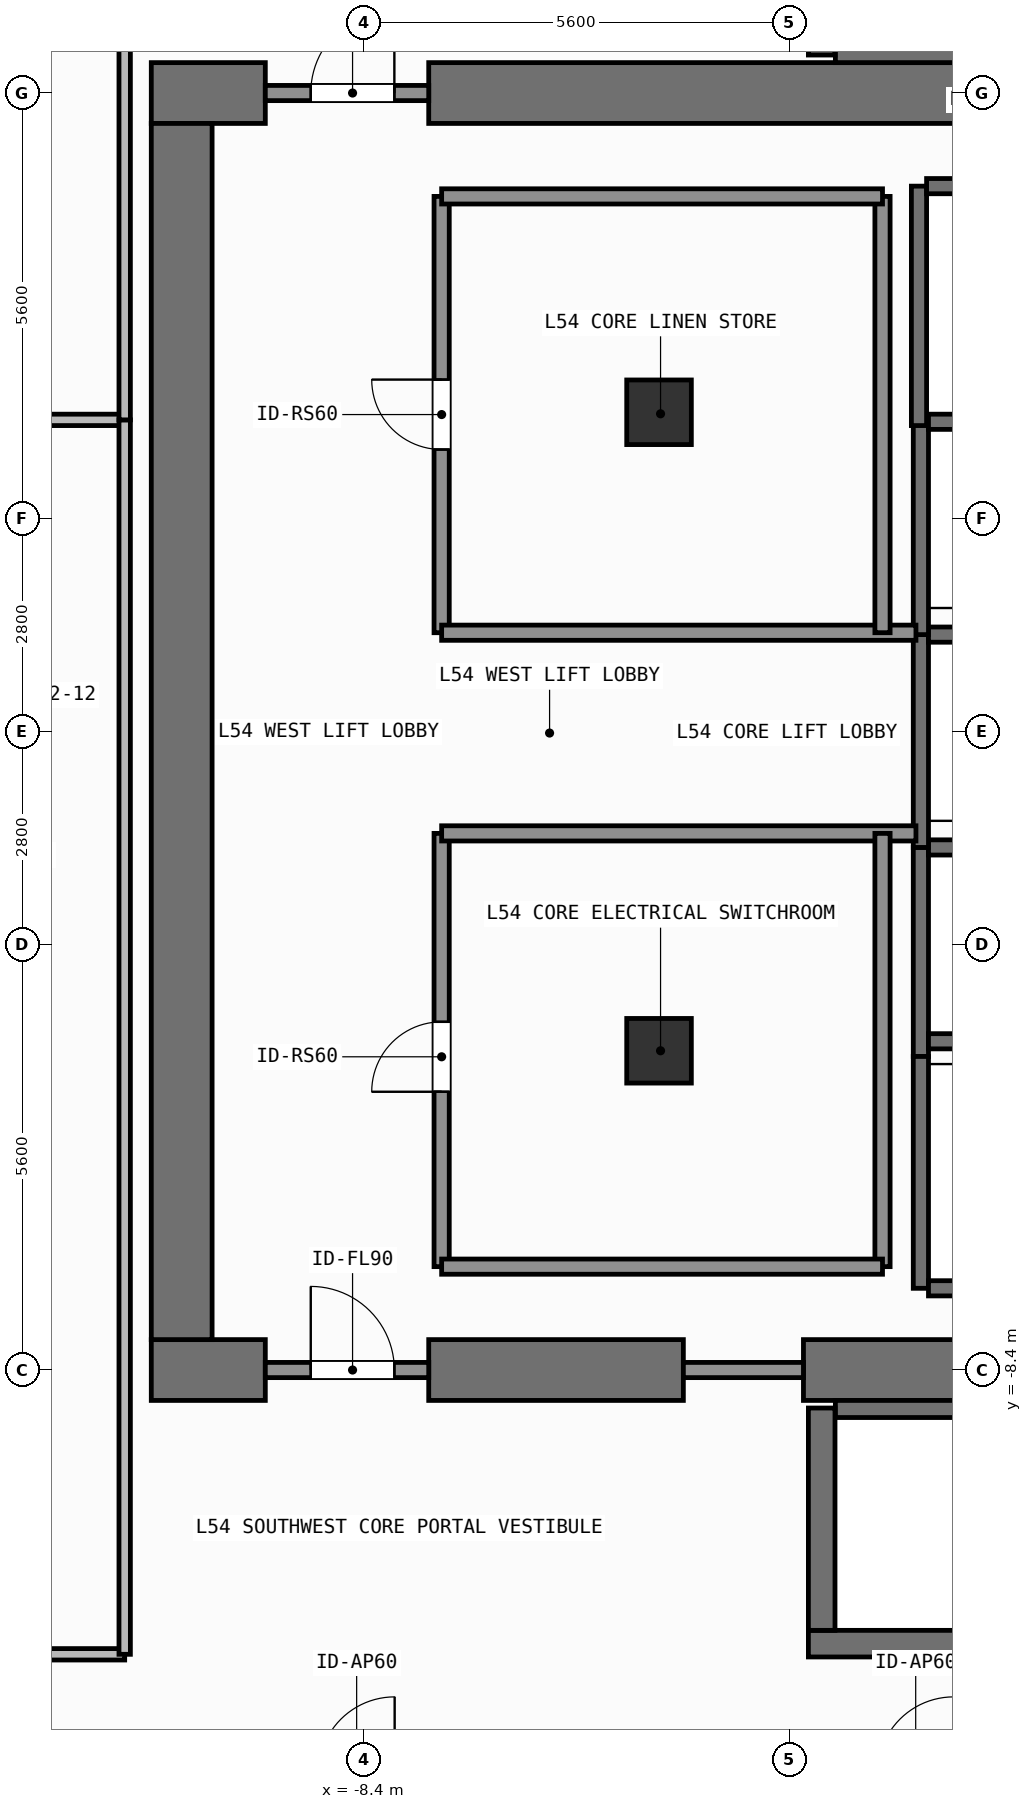
"""IFC4 building model, lengths in metres.
Left out: names, types, materials, properties, quantities, classifications, styles, units other than length and angle.
Written with IfcOpenShell. Run it as: python <this file> out.ifc"""

import sys

from ifc_helpers import new_model, si_unit, direction, frame, frame_2d, origin, origin_2d, place, context, subcontext, project, spatial, rectangle, extrude, element, fill, save


model = new_model("IFC4")
c1 = context("Model", 3, precision=1e-05, world=origin(), true_north=direction((0.0, 1.0)))
c2 = subcontext(c1, "Body", "Model", "MODEL_VIEW")
j1 = project(units=[si_unit("LENGTHUNIT", "METRE"), si_unit("PLANEANGLEUNIT", "RADIAN")], contexts=[c1])
p1 = place(None, origin())
s1 = spatial("IfcSite", under=j1, at=p1, CompositionType="ELEMENT")
p2 = place(p1, origin())
s2 = spatial("IfcBuilding", under=s1, at=p2, CompositionType="ELEMENT")
p3 = place(p2, frame((0.0, 0.0, 219.6)))
s3 = spatial("IfcBuildingStorey", under=s2, at=p3, CompositionType="ELEMENT", Elevation=219.6)
p4 = place(p3, frame((-11.2, -8.4, 0.0), z_axis=(0.0, 0.0, 1.0), x_axis=(1.0, 0.0, 0.0)))
e1 = element("IfcWall", 1, at=p4, inside=s3, PredefinedType="SHEAR", context=c2, shape_type="SweptSolid", body=[
    extrude(rectangle(XDim=1.5, YDim=0.8, at=frame_2d((0.75, 0.0))), origin(), (0.0, 0.0, 1.0), 3.9),
])
p5 = place(p3, frame((-7.55, -8.4, 0.0), z_axis=(0.0, 0.0, 1.0), x_axis=(1.0, 0.0, 0.0)))
e2 = element("IfcWall", 2, at=p5, inside=s3, PredefinedType="SHEAR", context=c2, shape_type="SweptSolid", body=[
    extrude(rectangle(XDim=3.35, YDim=0.8, at=frame_2d((1.675, 0.0))), origin(), (0.0, 0.0, 1.0), 3.9),
])
p6 = place(p3, frame((-2.62, -8.4, 0.0), z_axis=(0.0, 0.0, 1.0), x_axis=(1.0, 0.0, 0.0)))
e3 = element("IfcWall", 3, at=p6, inside=s3, PredefinedType="SHEAR", context=c2, shape_type="SweptSolid", body=[
    extrude(rectangle(XDim=7.27, YDim=0.8, at=frame_2d((3.635, 0.0))), origin(), (0.0, 0.0, 1.0), 3.9),
])
p7 = place(p3, frame((-11.2, 8.4, 0.0), z_axis=(0.0, 0.0, 1.0), x_axis=(1.0, 0.0, 0.0)))
e4 = element("IfcWall", 4, at=p7, inside=s3, PredefinedType="SHEAR", context=c2, shape_type="SweptSolid", body=[
    extrude(rectangle(XDim=1.5, YDim=0.8, at=frame_2d((0.75, 0.0))), origin(), (0.0, 0.0, 1.0), 3.9),
])
p8 = place(p3, frame((-7.55, 8.4, 0.0), z_axis=(0.0, 0.0, 1.0), x_axis=(1.0, 0.0, 0.0)))
e5 = element("IfcWall", 5, at=p8, inside=s3, PredefinedType="SHEAR", context=c2, shape_type="SweptSolid", body=[
    extrude(rectangle(XDim=16.35, YDim=0.8, at=frame_2d((8.175, 0.0))), origin(), (0.0, 0.0, 1.0), 3.9),
])
p9 = place(p3, frame((-10.8, -8.0, 0.0), z_axis=(0.0, 0.0, 1.0), x_axis=(0.0, 1.0, 0.0)))
e6 = element("IfcWall", 6, at=p9, inside=s3, PredefinedType="SHEAR", context=c2, shape_type="SweptSolid", body=[
    extrude(rectangle(XDim=16.0, YDim=0.8, at=frame_2d((8.0, 0.0))), origin(), (0.0, 0.0, 1.0), 3.9),
])
p10 = place(p3, frame((-2.555, -12.0, 0.0), z_axis=(0.0, 0.0, 1.0), x_axis=(1.0, 0.0, 0.0)))
e7 = element("IfcWall", 7, at=p10, inside=s3, PredefinedType="SHEAR", context=c2, shape_type="SweptSolid", body=[
    extrude(rectangle(XDim=7.31, YDim=0.35, at=frame_2d((3.655, 0.0))), origin(), (0.0, 0.0, 1.0), 3.9),
])
p11 = place(p3, frame((-2.2, -8.913, 0.0), z_axis=(0.0, 0.0, 1.0), x_axis=(1.0, 0.0, 0.0)))
e8 = element("IfcWall", 8, at=p11, inside=s3, PredefinedType="SHEAR", context=c2, shape_type="SweptSolid", body=[
    extrude(rectangle(XDim=6.6, YDim=0.225, at=frame_2d((3.3, 0.0))), origin(), (0.0, 0.0, 1.0), 3.9),
])
p12 = place(p3, frame((-2.38, -11.825, 0.0), z_axis=(0.0, 0.0, 1.0), x_axis=(0.0, 1.0, 0.0)))
e9 = element("IfcWall", 9, at=p12, inside=s3, PredefinedType="SHEAR", context=c2, shape_type="SweptSolid", body=[
    extrude(rectangle(XDim=2.925, YDim=0.35, at=frame_2d((1.462, 0.0))), origin(), (0.0, 0.0, 1.0), 3.9),
])
p13 = place(p3, frame((-2.2, 8.913, 0.0), z_axis=(0.0, 0.0, 1.0), x_axis=(1.0, 0.0, 0.0)))
e10 = element("IfcWall", 10, at=p13, inside=s3, PredefinedType="SHEAR", context=c2, shape_type="SweptSolid", body=[
    extrude(rectangle(XDim=6.6, YDim=0.225, at=frame_2d((3.3, 0.0))), origin(), (0.0, 0.0, 1.0), 3.9),
])
p14 = place(p3, frame((-2.38, 8.9, 0.0), z_axis=(0.0, 0.0, 1.0), x_axis=(0.0, 1.0, 0.0)))
e11 = element("IfcWall", 11, at=p14, inside=s3, PredefinedType="SHEAR", context=c2, shape_type="SweptSolid", body=[
    extrude(rectangle(XDim=2.925, YDim=0.35, at=frame_2d((1.462, 0.0))), origin(), (0.0, 0.0, 1.0), 3.9),
])
for number, where, z_axis, x_axis in (
    (12, (-4.52, -4.2, 0.0), (0.0, 0.0, 1.0), (1.0, 0.0, 0.0)),
    (13, (-4.52, 4.2, 0.0), (0.0, 0.0, 1.0), (1.0, 0.0, 0.0)),
):
    element("IfcColumn", number, at=place(p3, frame(where, z_axis=z_axis, x_axis=x_axis)), inside=s3, PredefinedType="COLUMN", context=c2, shape_type="SweptSolid", body=[
        extrude(rectangle(XDim=0.85, YDim=0.85, at=origin_2d()), origin(), (0.0, 0.0, 1.0), 3.9),
    ])
p15 = place(p3, frame((-1.075, -4.275, 0.0), z_axis=(0.0, 0.0, 1.0), x_axis=(0.0, 1.0, 0.0)))
e14 = element("IfcWall", 14, at=p15, inside=s3, PredefinedType="SHEAR", context=c2, shape_type="SweptSolid", body=[
    extrude(rectangle(XDim=2.75, YDim=0.2, at=frame_2d((1.375, 0.0))), origin(), (0.0, 0.0, 1.0), 3.68),
])
for number, where, z_axis, x_axis in (
    (15, (-0.975, -4.075, 0.0), (0.0, 0.0, 1.0), (1.0, 0.0, 0.0)),
    (16, (-0.975, -1.525, 0.0), (0.0, 0.0, 1.0), (1.0, 0.0, 0.0)),
):
    element("IfcWall", number, at=place(p3, frame(where, z_axis=z_axis, x_axis=x_axis)), inside=s3, PredefinedType="SHEAR", context=c2, shape_type="SweptSolid", body=[
        extrude(rectangle(XDim=2.35, YDim=0.2, at=frame_2d((1.175, 0.0))), origin(), (0.0, 0.0, 1.0), 3.68),
    ])
p16 = place(p3, frame((-1.075, -1.525, 0.0), z_axis=(0.0, 0.0, 1.0), x_axis=(0.0, 1.0, 0.0)))
e17 = element("IfcWall", 17, at=p16, inside=s3, PredefinedType="SHEAR", context=c2, shape_type="SweptSolid", body=[
    extrude(rectangle(XDim=2.8, YDim=0.2, at=frame_2d((1.4, 0.0))), origin(), (0.0, 0.0, 1.0), 3.68),
])
p17 = place(p3, frame((-0.975, 1.275, 0.0), z_axis=(0.0, 0.0, 1.0), x_axis=(1.0, 0.0, 0.0)))
e18 = element("IfcWall", 18, at=p17, inside=s3, PredefinedType="SHEAR", context=c2, shape_type="SweptSolid", body=[
    extrude(rectangle(XDim=2.35, YDim=0.2, at=frame_2d((1.175, 0.0))), origin(), (0.0, 0.0, 1.0), 3.68),
])
p18 = place(p3, frame((-1.075, 1.275, 0.0), z_axis=(0.0, 0.0, 1.0), x_axis=(0.0, 1.0, 0.0)))
e19 = element("IfcWall", 19, at=p18, inside=s3, PredefinedType="SHEAR", context=c2, shape_type="SweptSolid", body=[
    extrude(rectangle(XDim=2.8, YDim=0.2, at=frame_2d((1.4, 0.0))), origin(), (0.0, 0.0, 1.0), 3.68),
])
p19 = place(p3, frame((-0.975, 4.075, 0.0), z_axis=(0.0, 0.0, 1.0), x_axis=(1.0, 0.0, 0.0)))
e20 = element("IfcWall", 20, at=p19, inside=s3, PredefinedType="SHEAR", context=c2, shape_type="SweptSolid", body=[
    extrude(rectangle(XDim=2.35, YDim=0.2, at=frame_2d((1.175, 0.0))), origin(), (0.0, 0.0, 1.0), 3.68),
])
p20 = place(p3, frame((-1.1, 4.025, 0.0), z_axis=(0.0, 0.0, 1.0), x_axis=(0.0, 1.0, 0.0)))
e21 = element("IfcWall", 21, at=p20, inside=s3, PredefinedType="SHEAR", context=c2, shape_type="SweptSolid", body=[
    extrude(rectangle(XDim=3.15, YDim=0.2, at=frame_2d((1.575, 0.0))), origin(), (0.0, 0.0, 1.0), 3.68),
])
p21 = place(p3, frame((-1.0, 7.175, 0.0), z_axis=(0.0, 0.0, 1.0), x_axis=(1.0, 0.0, 0.0)))
e22 = element("IfcWall", 22, at=p21, inside=s3, PredefinedType="SHEAR", context=c2, shape_type="SweptSolid", body=[
    extrude(rectangle(XDim=2.4, YDim=0.2, at=frame_2d((1.2, 0.0))), origin(), (0.0, 0.0, 1.0), 3.68),
])
p22 = place(p3, frame((-1.075, -7.325, 0.0), z_axis=(0.0, 0.0, 1.0), x_axis=(0.0, 1.0, 0.0)))
e23 = element("IfcWall", 23, at=p22, inside=s3, PredefinedType="SHEAR", context=c2, shape_type="SweptSolid", body=[
    extrude(rectangle(XDim=3.05, YDim=0.2, at=frame_2d((1.525, 0.0))), origin(), (0.0, 0.0, 1.0), 3.68),
])
p23 = place(p3, frame((-0.975, -7.325, 0.0), z_axis=(0.0, 0.0, 1.0), x_axis=(1.0, 0.0, 0.0)))
e24 = element("IfcWall", 24, at=p23, inside=s3, PredefinedType="SHEAR", context=c2, shape_type="SweptSolid", body=[
    extrude(rectangle(XDim=2.35, YDim=0.2, at=frame_2d((1.175, 0.0))), origin(), (0.0, 0.0, 1.0), 3.68),
])
p24 = place(p3, frame((-9.7, -8.4, 0.0), z_axis=(0.0, 0.0, 1.0), x_axis=(1.0, 0.0, 0.0)))
e25 = element("IfcWall", 25, at=p24, inside=s3, PredefinedType="SOLIDWALL", context=c2, shape_type="SweptSolid", body=[
    extrude(rectangle(XDim=2.15, YDim=0.2, at=frame_2d((1.075, 0.0))), origin(), (0.0, 0.0, 1.0), 2.82),
])
p25 = place(p24, frame((0.598, 0.0, 0.0)))
e26 = element("IfcOpeningElement", 26, at=p25, cuts=e25, PredefinedType="OPENING", context=c2, shape_type="SweptSolid", body=[
    extrude(rectangle(XDim=1.1, YDim=2.15, at=frame_2d((0.55, 1.075))), frame((0.0, 0.11, 0.0), z_axis=(0.0, -1.0, 0.0), x_axis=(1.0, 0.0, 0.0)), (0.0, 0.0, 1.0), 0.22),
])
p26 = place(p3, frame((-9.7, 8.4, 0.0), z_axis=(0.0, 0.0, 1.0), x_axis=(1.0, 0.0, 0.0)))
e27 = element("IfcWall", 27, at=p26, inside=s3, PredefinedType="SOLIDWALL", context=c2, shape_type="SweptSolid", body=[
    extrude(rectangle(XDim=2.15, YDim=0.2, at=frame_2d((1.075, 0.0))), origin(), (0.0, 0.0, 1.0), 2.82),
])
p27 = place(p26, frame((0.598, 0.0, 0.0)))
e28 = element("IfcOpeningElement", 28, at=p27, cuts=e27, PredefinedType="OPENING", context=c2, shape_type="SweptSolid", body=[
    extrude(rectangle(XDim=1.1, YDim=2.15, at=frame_2d((0.55, 1.075))), frame((0.0, 0.11, 0.0), z_axis=(0.0, -1.0, 0.0), x_axis=(1.0, 0.0, 0.0)), (0.0, 0.0, 1.0), 0.22),
])
p28 = place(p3, frame((-7.38, -7.04, 0.0), z_axis=(0.0, 0.0, 1.0), x_axis=(0.0, 1.0, 0.0)))
e29 = element("IfcWall", 29, at=p28, inside=s3, PredefinedType="SOLIDWALL", context=c2, shape_type="SweptSolid", body=[
    extrude(rectangle(XDim=5.7, YDim=0.2, at=frame_2d((2.85, 0.0))), origin(), (0.0, 0.0, 1.0), 3.68),
])
p29 = place(p28, frame((2.301, 0.0, 0.0)))
e30 = element("IfcOpeningElement", 30, at=p29, cuts=e29, PredefinedType="OPENING", context=c2, shape_type="SweptSolid", body=[
    extrude(rectangle(XDim=0.92, YDim=2.1, at=frame_2d((0.46, 1.05))), frame((0.0, 0.11, 0.0), z_axis=(0.0, -1.0, 0.0), x_axis=(1.0, 0.0, 0.0)), (0.0, 0.0, 1.0), 0.22),
])
p30 = place(p3, frame((-7.38, 1.3, 0.0), z_axis=(0.0, 0.0, 1.0), x_axis=(0.0, 1.0, 0.0)))
e31 = element("IfcWall", 31, at=p30, inside=s3, PredefinedType="SOLIDWALL", context=c2, shape_type="SweptSolid", body=[
    extrude(rectangle(XDim=5.74, YDim=0.2, at=frame_2d((2.87, 0.0))), origin(), (0.0, 0.0, 1.0), 3.68),
])
p31 = place(p30, frame((2.41, 0.0, 0.0)))
e32 = element("IfcOpeningElement", 32, at=p31, cuts=e31, PredefinedType="OPENING", context=c2, shape_type="SweptSolid", body=[
    extrude(rectangle(XDim=0.92, YDim=2.1, at=frame_2d((0.46, 1.05))), frame((0.0, 0.11, 0.0), z_axis=(0.0, -1.0, 0.0), x_axis=(1.0, 0.0, 0.0)), (0.0, 0.0, 1.0), 0.22),
])
p32 = place(p3, frame((-18.33, -12.14, 0.0), z_axis=(0.0, 0.0, 1.0), x_axis=(1.0, 0.0, 0.0)))
e33 = element("IfcWall", 33, at=p32, inside=s3, PredefinedType="PARTITIONING", context=c2, shape_type="SweptSolid", body=[
    extrude(rectangle(XDim=6.78, YDim=0.15, at=frame_2d((3.39, 0.0))), origin(), (0.0, 0.0, 1.0), 3.68),
])
p33 = place(p32, frame((2.85, 0.0, 0.0)))
e34 = element("IfcOpeningElement", 34, at=p33, cuts=e33, PredefinedType="OPENING", context=c2, shape_type="SweptSolid", body=[
    extrude(rectangle(XDim=0.9, YDim=2.1, at=frame_2d((0.45, 1.05))), frame((0.0, 0.085, 0.0), z_axis=(0.0, -1.0, 0.0), x_axis=(1.0, 0.0, 0.0)), (0.0, 0.0, 1.0), 0.17),
])
p34 = place(p3, frame((-4.2, -8.4, 0.0), z_axis=(0.0, 0.0, 1.0), x_axis=(1.0, 0.0, 0.0)))
e35 = element("IfcWall", 35, at=p34, inside=s3, PredefinedType="SOLIDWALL", context=c2, shape_type="SweptSolid", body=[
    extrude(rectangle(XDim=1.58, YDim=0.2, at=frame_2d((0.79, 0.0))), origin(), (0.0, 0.0, 1.0), 2.82),
])
for number, where, z_axis, x_axis in (
    (36, (-7.38, -1.34, 0.0), (0.0, 0.0, 1.0), (1.0, 0.0, 0.0)),
    (37, (-7.38, 1.3, 0.0), (0.0, 0.0, 1.0), (1.0, 0.0, 0.0)),
):
    element("IfcWall", number, at=place(p3, frame(where, z_axis=z_axis, x_axis=x_axis)), inside=s3, PredefinedType="SOLIDWALL", context=c2, shape_type="SweptSolid", body=[
        extrude(rectangle(XDim=6.24, YDim=0.2, at=frame_2d((3.12, 0.0))), origin(), (0.0, 0.0, 1.0), 3.68),
    ])
p35 = place(p3, frame((-1.58, -7.04, 0.0), z_axis=(0.0, 0.0, 1.0), x_axis=(0.0, 1.0, 0.0)))
e38 = element("IfcWall", 38, at=p35, inside=s3, PredefinedType="SOLIDWALL", context=c2, shape_type="SweptSolid", body=[
    extrude(rectangle(XDim=5.7, YDim=0.2, at=frame_2d((2.85, 0.0))), origin(), (0.0, 0.0, 1.0), 3.68),
])
p36 = place(p3, frame((-7.38, -7.04, 0.0), z_axis=(0.0, 0.0, 1.0), x_axis=(1.0, 0.0, 0.0)))
e39 = element("IfcWall", 39, at=p36, inside=s3, PredefinedType="SOLIDWALL", context=c2, shape_type="SweptSolid", body=[
    extrude(rectangle(XDim=5.8, YDim=0.2, at=frame_2d((2.9, 0.0))), origin(), (0.0, 0.0, 1.0), 3.68),
])
p37 = place(p3, frame((-1.58, 1.3, 0.0), z_axis=(0.0, 0.0, 1.0), x_axis=(0.0, 1.0, 0.0)))
e40 = element("IfcWall", 40, at=p37, inside=s3, PredefinedType="SOLIDWALL", context=c2, shape_type="SweptSolid", body=[
    extrude(rectangle(XDim=5.74, YDim=0.2, at=frame_2d((2.87, 0.0))), origin(), (0.0, 0.0, 1.0), 3.68),
])
p38 = place(p3, frame((-7.38, 7.04, 0.0), z_axis=(0.0, 0.0, 1.0), x_axis=(1.0, 0.0, 0.0)))
e41 = element("IfcWall", 41, at=p38, inside=s3, PredefinedType="SOLIDWALL", context=c2, shape_type="SweptSolid", body=[
    extrude(rectangle(XDim=5.8, YDim=0.2, at=frame_2d((2.9, 0.0))), origin(), (0.0, 0.0, 1.0), 3.68),
])
p39 = place(p3, frame((-18.33, 4.1, 0.0), z_axis=(0.0, 0.0, 1.0), x_axis=(1.0, 0.0, 0.0)))
e42 = element("IfcWall", 42, at=p39, inside=s3, PredefinedType="PARTITIONING", context=c2, shape_type="SweptSolid", body=[
    extrude(rectangle(XDim=6.78, YDim=0.15, at=frame_2d((3.39, 0.0))), origin(), (0.0, 0.0, 1.0), 3.68),
])
p40 = place(p3, frame((-11.55, -12.14, 0.0), z_axis=(0.0, 0.0, 1.0), x_axis=(0.0, 1.0, 0.0)))
e43 = element("IfcWall", 43, at=p40, inside=s3, PredefinedType="PARTITIONING", context=c2, shape_type="SweptSolid", body=[
    extrude(rectangle(XDim=16.24, YDim=0.15, at=frame_2d((8.12, 0.0))), origin(), (0.0, 0.0, 1.0), 3.68),
])
p41 = place(p3, frame((-11.55, 4.1, 0.0), z_axis=(0.0, 0.0, 1.0), x_axis=(0.0, 1.0, 0.0)))
e44 = element("IfcWall", 44, at=p41, inside=s3, PredefinedType="PARTITIONING", context=c2, shape_type="SweptSolid", body=[
    extrude(rectangle(XDim=8.04, YDim=0.15, at=frame_2d((4.02, 0.0))), origin(), (0.0, 0.0, 1.0), 3.68),
])
p42 = place(p25, origin())
e45 = element("IfcDoor", 45, at=p42, inside=s3, OperationType="SINGLE_SWING_LEFT", PredefinedType="DOOR", context=c2, shape_type="SweptSolid", body=[
    extrude(rectangle(XDim=1.1, YDim=2.15, at=frame_2d((0.55, 1.075))), frame((0.0, 0.025, 0.0), z_axis=(0.0, -1.0, 0.0), x_axis=(1.0, 0.0, 0.0)), (0.0, 0.0, 1.0), 0.05),
])
fill(e26, e45)
p43 = place(p27, origin())
e46 = element("IfcDoor", 46, at=p43, inside=s3, OperationType="SINGLE_SWING_RIGHT", PredefinedType="DOOR", context=c2, shape_type="SweptSolid", body=[
    extrude(rectangle(XDim=1.1, YDim=2.15, at=frame_2d((0.55, 1.075))), frame((0.0, 0.025, 0.0), z_axis=(0.0, -1.0, 0.0), x_axis=(1.0, 0.0, 0.0)), (0.0, 0.0, 1.0), 0.05),
])
fill(e28, e46)
p44 = place(p29, origin())
e47 = element("IfcDoor", 47, at=p44, inside=s3, OperationType="SINGLE_SWING_LEFT", PredefinedType="DOOR", context=c2, shape_type="SweptSolid", body=[
    extrude(rectangle(XDim=0.92, YDim=2.1, at=frame_2d((0.46, 1.05))), frame((0.0, 0.025, 0.0), z_axis=(0.0, -1.0, 0.0), x_axis=(1.0, 0.0, 0.0)), (0.0, 0.0, 1.0), 0.05),
])
fill(e30, e47)
p45 = place(p31, origin())
e48 = element("IfcDoor", 48, at=p45, inside=s3, OperationType="SINGLE_SWING_RIGHT", PredefinedType="DOOR", context=c2, shape_type="SweptSolid", body=[
    extrude(rectangle(XDim=0.92, YDim=2.1, at=frame_2d((0.46, 1.05))), frame((0.0, 0.025, 0.0), z_axis=(0.0, -1.0, 0.0), x_axis=(1.0, 0.0, 0.0)), (0.0, 0.0, 1.0), 0.05),
])
fill(e32, e48)
save(model, sys.argv[1])
